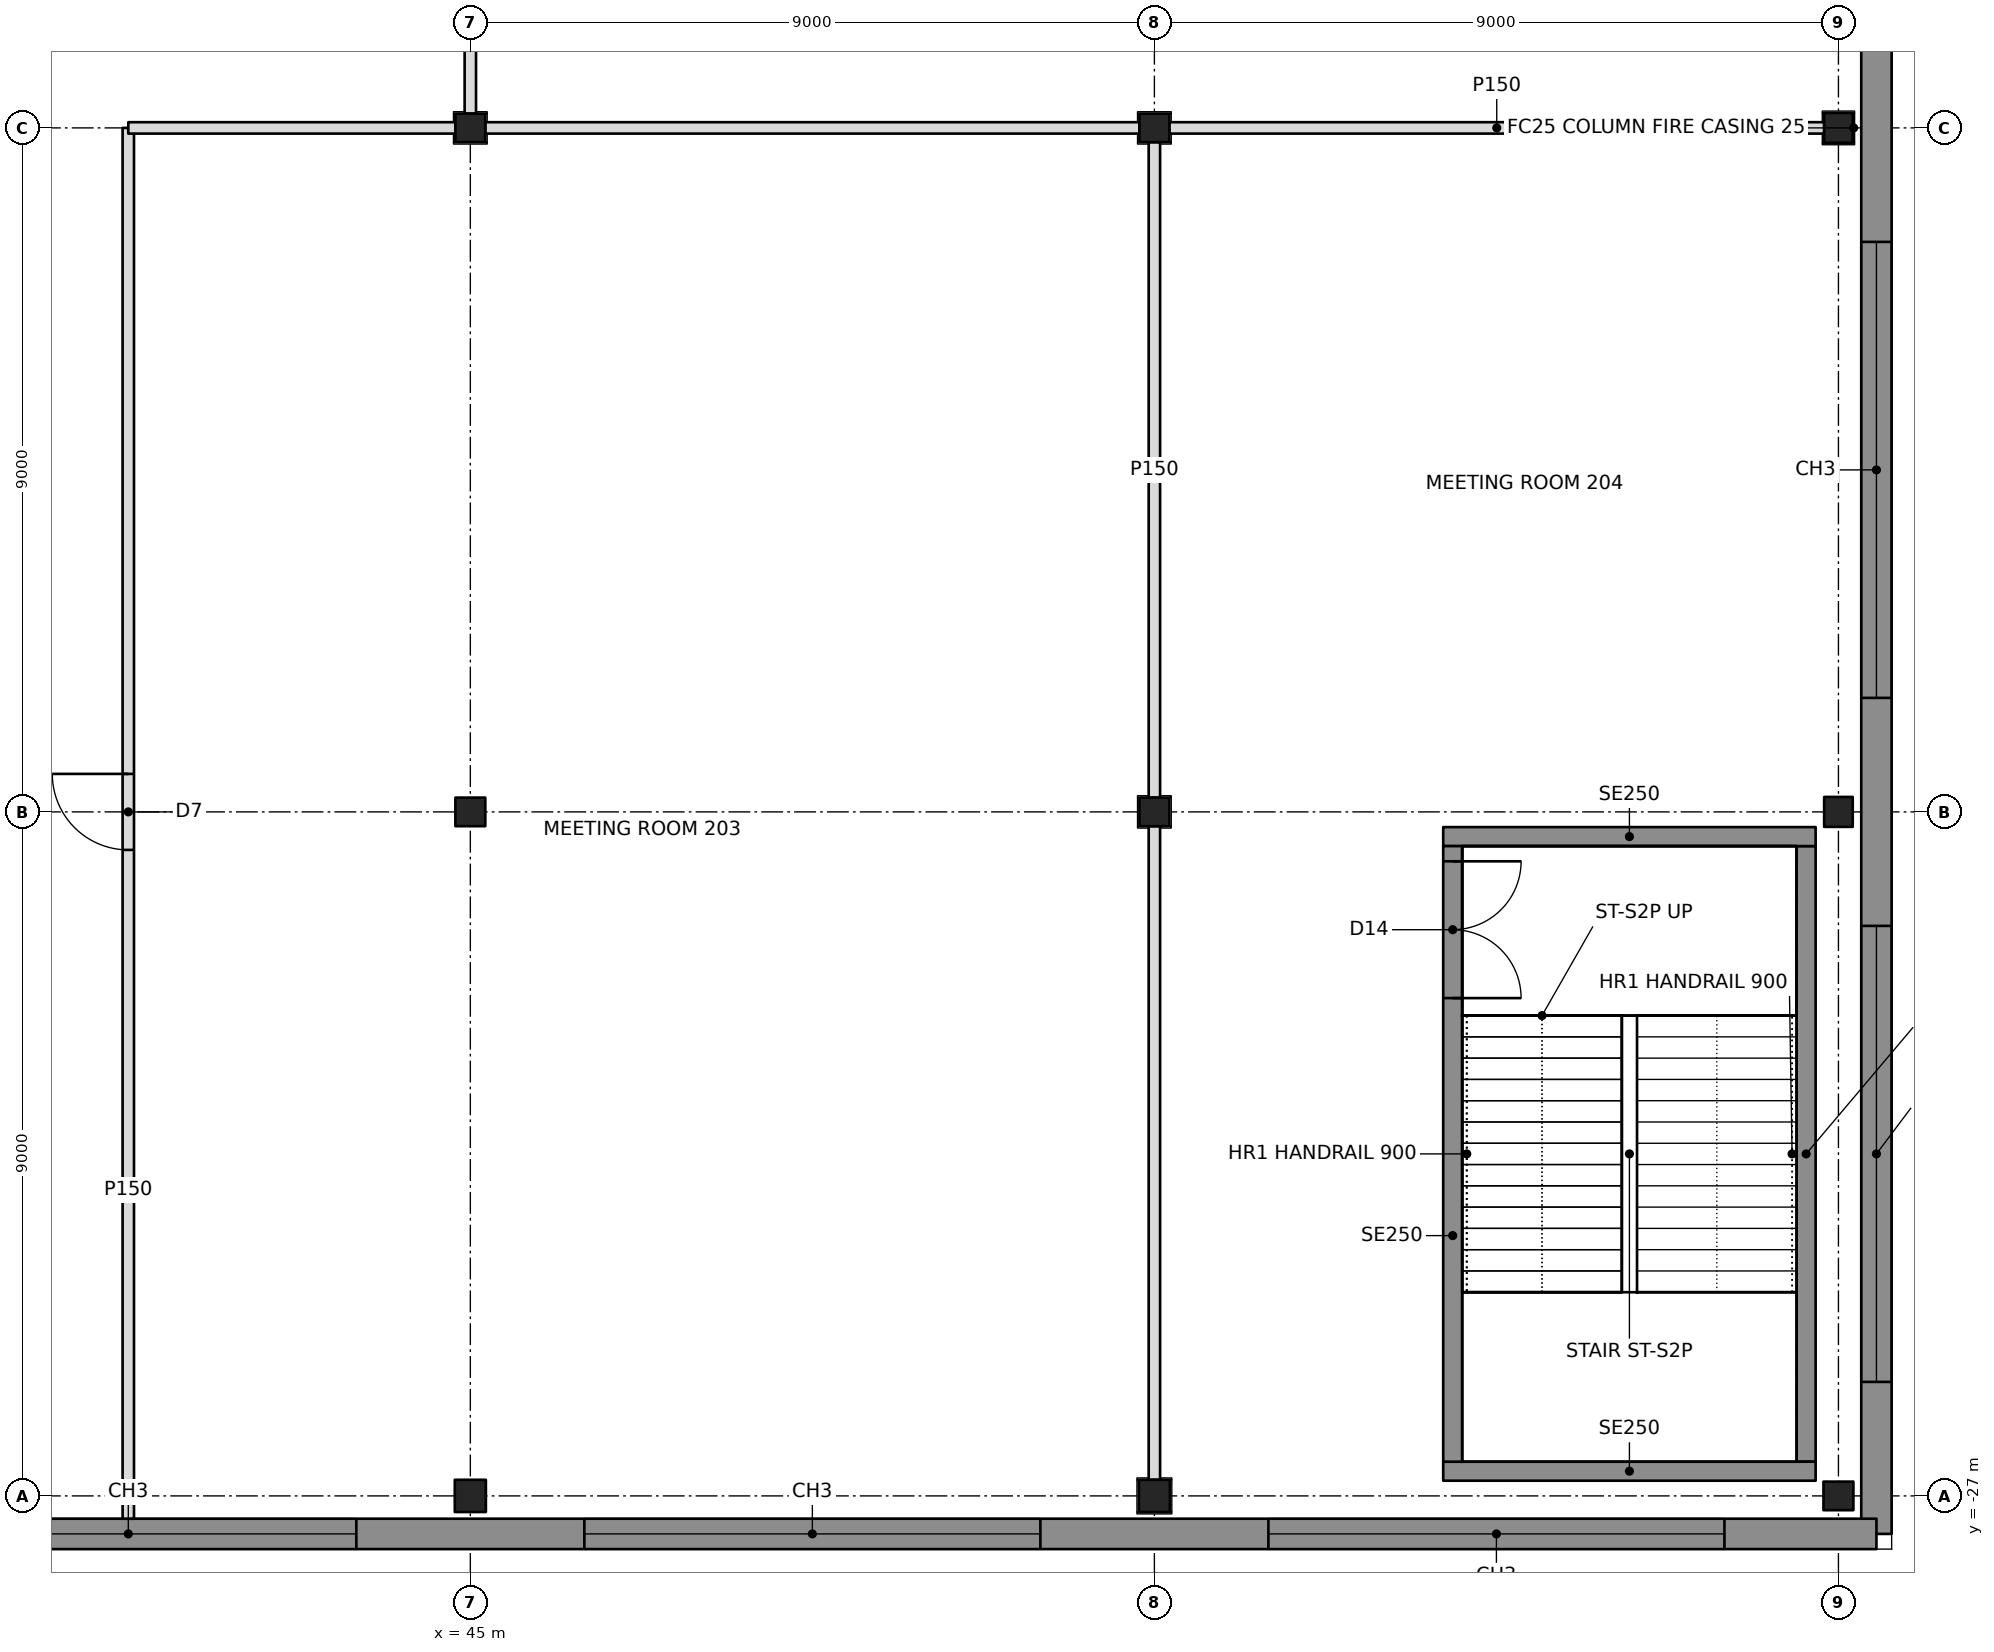
"""IFC4 building model, lengths in metres.
Left out: names, types, materials, properties, quantities, classifications, styles, units other than length and angle.
Written with IfcOpenShell. Run it as: python <this file> out.ifc"""

import sys

from ifc_helpers import new_model, si_unit, direction, frame, frame_2d, origin, origin_2d, place, context, subcontext, project, spatial, rectangle, i_section, extrude, element, fill, save


model = new_model("IFC4")
c1 = context("Model", 3, precision=1e-05, world=origin(), true_north=direction((0.0, 1.0)))
c2 = subcontext(c1, "Body", "Model", "MODEL_VIEW")
j1 = project(units=[si_unit("LENGTHUNIT", "METRE"), si_unit("PLANEANGLEUNIT", "RADIAN")], contexts=[c1])
p1 = place(None, origin())
s1 = spatial("IfcSite", under=j1, at=p1, CompositionType="ELEMENT")
p2 = place(p1, origin())
s2 = spatial("IfcBuilding", under=s1, at=p2, CompositionType="ELEMENT")
p3 = place(p2, frame((0.0, 0.0, 11.0)))
s3 = spatial("IfcBuildingStorey", under=s2, at=p3, CompositionType="ELEMENT", Elevation=11.0)
p4 = place(p3, frame((45.0, -27.0, 0.0), z_axis=(0.0, 0.0, 1.0), x_axis=(1.0, 0.0, 0.0)))
e1 = element("IfcColumn", 1, at=p4, inside=s3, PredefinedType="COLUMN", context=c2, shape_type="SweptSolid", body=[
    extrude(i_section(OverallWidth=0.409, OverallDepth=0.424, WebThickness=0.033, FlangeThickness=0.052, at=origin_2d()), origin(), (0.0, 0.0, 1.0), 5.0),
])
for number, where, z_axis, x_axis in (
    (2, (45.0, -18.0, 0.0), (0.0, 0.0, 1.0), (1.0, 0.0, 0.0)),
    (3, (45.0, -9.0, 0.0), (0.0, 0.0, 1.0), (1.0, 0.0, 0.0)),
):
    element("IfcColumn", number, at=place(p3, frame(where, z_axis=z_axis, x_axis=x_axis)), inside=s3, PredefinedType="COLUMN", context=c2, shape_type="SweptSolid", body=[
        extrude(i_section(OverallWidth=0.394, OverallDepth=0.376, WebThickness=0.017, FlangeThickness=0.028, at=origin_2d()), origin(), (0.0, 0.0, 1.0), 5.0),
    ])
p5 = place(p3, frame((54.0, -27.0, 0.0), z_axis=(0.0, 0.0, 1.0), x_axis=(1.0, 0.0, 0.0)))
e4 = element("IfcColumn", 4, at=p5, inside=s3, PredefinedType="COLUMN", context=c2, shape_type="SweptSolid", body=[
    extrude(i_section(OverallWidth=0.409, OverallDepth=0.424, WebThickness=0.033, FlangeThickness=0.052, at=origin_2d()), origin(), (0.0, 0.0, 1.0), 5.0),
])
for number, where, z_axis, x_axis in (
    (5, (54.0, -18.0, 0.0), (0.0, 0.0, 1.0), (1.0, 0.0, 0.0)),
    (6, (54.0, -9.0, 0.0), (0.0, 0.0, 1.0), (1.0, 0.0, 0.0)),
    (7, (63.0, -27.0, 0.0), (0.0, 0.0, 1.0), (1.0, 0.0, 0.0)),
    (8, (63.0, -18.0, 0.0), (0.0, 0.0, 1.0), (0.0, 1.0, 0.0)),
    (9, (63.0, -9.0, 0.0), (0.0, 0.0, 1.0), (0.0, 1.0, 0.0)),
):
    element("IfcColumn", number, at=place(p3, frame(where, z_axis=z_axis, x_axis=x_axis)), inside=s3, PredefinedType="COLUMN", context=c2, shape_type="SweptSolid", body=[
        extrude(i_section(OverallWidth=0.394, OverallDepth=0.376, WebThickness=0.017, FlangeThickness=0.028, at=origin_2d()), origin(), (0.0, 0.0, 1.0), 5.0),
    ])
p6 = place(p3, frame((-9.5, -27.5, 0.0), z_axis=(0.0, 0.0, 1.0), x_axis=(1.0, 0.0, 0.0)))
e10 = element("IfcWall", 10, at=p6, inside=s3, PredefinedType="SOLIDWALL", context=c2, shape_type="SweptSolid", body=[
    extrude(rectangle(XDim=73.0, YDim=0.4, at=frame_2d((36.5, 0.0))), origin(), (0.0, 0.0, 1.0), 4.75),
])
p7 = place(p6, frame((2.0, 0.0, 0.9)))
e11 = element("IfcOpeningElement", 11, at=p7, cuts=e10, PredefinedType="OPENING", context=c2, shape_type="SweptSolid", body=[
    extrude(rectangle(XDim=6.0, YDim=2.6, at=frame_2d((3.0, 1.3))), frame((0.0, 0.21, 0.0), z_axis=(0.0, -1.0, 0.0), x_axis=(1.0, 0.0, 0.0)), (0.0, 0.0, 1.0), 0.42),
])
p8 = place(p6, frame((11.0, 0.0, 0.9)))
e12 = element("IfcOpeningElement", 12, at=p8, cuts=e10, PredefinedType="OPENING", context=c2, shape_type="SweptSolid", body=[
    extrude(rectangle(XDim=6.0, YDim=2.6, at=frame_2d((3.0, 1.3))), frame((0.0, 0.21, 0.0), z_axis=(0.0, -1.0, 0.0), x_axis=(1.0, 0.0, 0.0)), (0.0, 0.0, 1.0), 0.42),
])
p9 = place(p6, frame((20.0, 0.0, 0.9)))
e13 = element("IfcOpeningElement", 13, at=p9, cuts=e10, PredefinedType="OPENING", context=c2, shape_type="SweptSolid", body=[
    extrude(rectangle(XDim=6.0, YDim=2.6, at=frame_2d((3.0, 1.3))), frame((0.0, 0.21, 0.0), z_axis=(0.0, -1.0, 0.0), x_axis=(1.0, 0.0, 0.0)), (0.0, 0.0, 1.0), 0.42),
])
p10 = place(p6, frame((29.0, 0.0, 0.9)))
e14 = element("IfcOpeningElement", 14, at=p10, cuts=e10, PredefinedType="OPENING", context=c2, shape_type="SweptSolid", body=[
    extrude(rectangle(XDim=6.0, YDim=2.6, at=frame_2d((3.0, 1.3))), frame((0.0, 0.21, 0.0), z_axis=(0.0, -1.0, 0.0), x_axis=(1.0, 0.0, 0.0)), (0.0, 0.0, 1.0), 0.42),
])
p11 = place(p6, frame((38.0, 0.0, 0.9)))
e15 = element("IfcOpeningElement", 15, at=p11, cuts=e10, PredefinedType="OPENING", context=c2, shape_type="SweptSolid", body=[
    extrude(rectangle(XDim=6.0, YDim=2.6, at=frame_2d((3.0, 1.3))), frame((0.0, 0.21, 0.0), z_axis=(0.0, -1.0, 0.0), x_axis=(1.0, 0.0, 0.0)), (0.0, 0.0, 1.0), 0.42),
])
p12 = place(p6, frame((47.0, 0.0, 0.9)))
e16 = element("IfcOpeningElement", 16, at=p12, cuts=e10, PredefinedType="OPENING", context=c2, shape_type="SweptSolid", body=[
    extrude(rectangle(XDim=6.0, YDim=2.6, at=frame_2d((3.0, 1.3))), frame((0.0, 0.21, 0.0), z_axis=(0.0, -1.0, 0.0), x_axis=(1.0, 0.0, 0.0)), (0.0, 0.0, 1.0), 0.42),
])
p13 = place(p6, frame((56.0, 0.0, 0.9)))
e17 = element("IfcOpeningElement", 17, at=p13, cuts=e10, PredefinedType="OPENING", context=c2, shape_type="SweptSolid", body=[
    extrude(rectangle(XDim=6.0, YDim=2.6, at=frame_2d((3.0, 1.3))), frame((0.0, 0.21, 0.0), z_axis=(0.0, -1.0, 0.0), x_axis=(1.0, 0.0, 0.0)), (0.0, 0.0, 1.0), 0.42),
])
p14 = place(p6, frame((65.0, 0.0, 0.9)))
e18 = element("IfcOpeningElement", 18, at=p14, cuts=e10, PredefinedType="OPENING", context=c2, shape_type="SweptSolid", body=[
    extrude(rectangle(XDim=6.0, YDim=2.6, at=frame_2d((3.0, 1.3))), frame((0.0, 0.21, 0.0), z_axis=(0.0, -1.0, 0.0), x_axis=(1.0, 0.0, 0.0)), (0.0, 0.0, 1.0), 0.42),
])
p15 = place(p3, frame((63.5, -27.5, 0.0), z_axis=(0.0, 0.0, 1.0), x_axis=(0.0, 1.0, 0.0)))
e19 = element("IfcWall", 19, at=p15, inside=s3, PredefinedType="SOLIDWALL", context=c2, shape_type="SweptSolid", body=[
    extrude(rectangle(XDim=73.0, YDim=0.4, at=frame_2d((36.5, 0.0))), origin(), (0.0, 0.0, 1.0), 4.75),
])
p16 = place(p15, frame((2.0, 0.0, 0.9)))
e20 = element("IfcOpeningElement", 20, at=p16, cuts=e19, PredefinedType="OPENING", context=c2, shape_type="SweptSolid", body=[
    extrude(rectangle(XDim=6.0, YDim=2.6, at=frame_2d((3.0, 1.3))), frame((0.0, 0.21, 0.0), z_axis=(0.0, -1.0, 0.0), x_axis=(1.0, 0.0, 0.0)), (0.0, 0.0, 1.0), 0.42),
])
p17 = place(p15, frame((11.0, 0.0, 0.9)))
e21 = element("IfcOpeningElement", 21, at=p17, cuts=e19, PredefinedType="OPENING", context=c2, shape_type="SweptSolid", body=[
    extrude(rectangle(XDim=6.0, YDim=2.6, at=frame_2d((3.0, 1.3))), frame((0.0, 0.21, 0.0), z_axis=(0.0, -1.0, 0.0), x_axis=(1.0, 0.0, 0.0)), (0.0, 0.0, 1.0), 0.42),
])
p18 = place(p15, frame((20.0, 0.0, 0.9)))
e22 = element("IfcOpeningElement", 22, at=p18, cuts=e19, PredefinedType="OPENING", context=c2, shape_type="SweptSolid", body=[
    extrude(rectangle(XDim=6.0, YDim=2.6, at=frame_2d((3.0, 1.3))), frame((0.0, 0.21, 0.0), z_axis=(0.0, -1.0, 0.0), x_axis=(1.0, 0.0, 0.0)), (0.0, 0.0, 1.0), 0.42),
])
p19 = place(p15, frame((29.0, 0.0, 0.9)))
e23 = element("IfcOpeningElement", 23, at=p19, cuts=e19, PredefinedType="OPENING", context=c2, shape_type="SweptSolid", body=[
    extrude(rectangle(XDim=6.0, YDim=2.6, at=frame_2d((3.0, 1.3))), frame((0.0, 0.21, 0.0), z_axis=(0.0, -1.0, 0.0), x_axis=(1.0, 0.0, 0.0)), (0.0, 0.0, 1.0), 0.42),
])
p20 = place(p15, frame((38.0, 0.0, 0.9)))
e24 = element("IfcOpeningElement", 24, at=p20, cuts=e19, PredefinedType="OPENING", context=c2, shape_type="SweptSolid", body=[
    extrude(rectangle(XDim=6.0, YDim=2.6, at=frame_2d((3.0, 1.3))), frame((0.0, 0.21, 0.0), z_axis=(0.0, -1.0, 0.0), x_axis=(1.0, 0.0, 0.0)), (0.0, 0.0, 1.0), 0.42),
])
p21 = place(p15, frame((47.0, 0.0, 0.9)))
e25 = element("IfcOpeningElement", 25, at=p21, cuts=e19, PredefinedType="OPENING", context=c2, shape_type="SweptSolid", body=[
    extrude(rectangle(XDim=6.0, YDim=2.6, at=frame_2d((3.0, 1.3))), frame((0.0, 0.21, 0.0), z_axis=(0.0, -1.0, 0.0), x_axis=(1.0, 0.0, 0.0)), (0.0, 0.0, 1.0), 0.42),
])
p22 = place(p15, frame((56.0, 0.0, 0.9)))
e26 = element("IfcOpeningElement", 26, at=p22, cuts=e19, PredefinedType="OPENING", context=c2, shape_type="SweptSolid", body=[
    extrude(rectangle(XDim=6.0, YDim=2.6, at=frame_2d((3.0, 1.3))), frame((0.0, 0.21, 0.0), z_axis=(0.0, -1.0, 0.0), x_axis=(1.0, 0.0, 0.0)), (0.0, 0.0, 1.0), 0.42),
])
p23 = place(p15, frame((65.0, 0.0, 0.9)))
e27 = element("IfcOpeningElement", 27, at=p23, cuts=e19, PredefinedType="OPENING", context=c2, shape_type="SweptSolid", body=[
    extrude(rectangle(XDim=6.0, YDim=2.6, at=frame_2d((3.0, 1.3))), frame((0.0, 0.21, 0.0), z_axis=(0.0, -1.0, 0.0), x_axis=(1.0, 0.0, 0.0)), (0.0, 0.0, 1.0), 0.42),
])
p24 = place(p3, frame((40.5, -27.3, 0.0), z_axis=(0.0, 0.0, 1.0), x_axis=(0.0, 1.0, 0.0)))
e28 = element("IfcWall", 28, at=p24, inside=s3, PredefinedType="PARTITIONING", context=c2, shape_type="SweptSolid", body=[
    extrude(rectangle(XDim=18.3, YDim=0.15, at=frame_2d((9.15, 0.0))), origin(), (0.0, 0.0, 1.0), 3.891),
])
p25 = place(p24, frame((8.8, 0.0, 0.0)))
e29 = element("IfcOpeningElement", 29, at=p25, cuts=e28, PredefinedType="OPENING", context=c2, shape_type="SweptSolid", body=[
    extrude(rectangle(XDim=1.0, YDim=2.1, at=frame_2d((0.5, 1.05))), frame((0.0, 0.085, 0.0), z_axis=(0.0, -1.0, 0.0), x_axis=(1.0, 0.0, 0.0)), (0.0, 0.0, 1.0), 0.17),
])
p26 = place(p3, frame((40.5, -9.0, 0.0), z_axis=(0.0, 0.0, 1.0), x_axis=(1.0, 0.0, 0.0)))
e30 = element("IfcWall", 30, at=p26, inside=s3, PredefinedType="PARTITIONING", context=c2, shape_type="SweptSolid", body=[
    extrude(rectangle(XDim=4.303, YDim=0.15, at=frame_2d((2.152, 0.0))), origin(), (0.0, 0.0, 1.0), 3.892),
])
p27 = place(p3, frame((45.197, -9.0, 0.0), z_axis=(0.0, 0.0, 1.0), x_axis=(1.0, 0.0, 0.0)))
e31 = element("IfcWall", 31, at=p27, inside=s3, PredefinedType="PARTITIONING", context=c2, shape_type="SweptSolid", body=[
    extrude(rectangle(XDim=8.606, YDim=0.15, at=frame_2d((4.303, 0.0))), origin(), (0.0, 0.0, 1.0), 3.892),
])
p28 = place(p3, frame((45.0, -8.812, 0.0), z_axis=(0.0, 0.0, 1.0), x_axis=(0.0, 1.0, 0.0)))
e32 = element("IfcWall", 32, at=p28, inside=s3, PredefinedType="PARTITIONING", context=c2, shape_type="SweptSolid", body=[
    extrude(rectangle(XDim=8.412, YDim=0.15, at=frame_2d((4.206, 0.0))), origin(), (0.0, 0.0, 1.0), 3.892),
])
p29 = place(p3, frame((54.0, -9.188, 0.0), z_axis=(0.0, 0.0, 1.0), x_axis=(0.0, -1.0, 0.0)))
e33 = element("IfcWall", 33, at=p29, inside=s3, PredefinedType="PARTITIONING", context=c2, shape_type="SweptSolid", body=[
    extrude(rectangle(XDim=8.624, YDim=0.15, at=frame_2d((4.312, 0.0))), origin(), (0.0, 0.0, 1.0), 3.892),
])
p30 = place(p3, frame((54.0, -18.188, 0.0), z_axis=(0.0, 0.0, 1.0), x_axis=(0.0, -1.0, 0.0)))
e34 = element("IfcWall", 34, at=p30, inside=s3, PredefinedType="PARTITIONING", context=c2, shape_type="SweptSolid", body=[
    extrude(rectangle(XDim=8.6, YDim=0.15, at=frame_2d((4.3, 0.0))), origin(), (0.0, 0.0, 1.0), 3.892),
])
p31 = place(p3, frame((54.197, -9.0, 0.0), z_axis=(0.0, 0.0, 1.0), x_axis=(1.0, 0.0, 0.0)))
e35 = element("IfcWall", 35, at=p31, inside=s3, PredefinedType="PARTITIONING", context=c2, shape_type="SweptSolid", body=[
    extrude(rectangle(XDim=8.615, YDim=0.15, at=frame_2d((4.308, 0.0))), origin(), (0.0, 0.0, 1.0), 3.892),
])
for number, where, z_axis, x_axis in (
    (36, (57.8, -26.675, 0.0), (0.0, 0.0, 1.0), (1.0, 0.0, 0.0)),
    (37, (57.8, -18.325, 0.0), (0.0, 0.0, 1.0), (1.0, 0.0, 0.0)),
):
    element("IfcWall", number, at=place(p3, frame(where, z_axis=z_axis, x_axis=x_axis)), inside=s3, PredefinedType="SOLIDWALL", context=c2, shape_type="SweptSolid", body=[
        extrude(rectangle(XDim=4.9, YDim=0.25, at=frame_2d((2.45, 0.0))), origin(), (0.0, 0.0, 1.0), 4.75),
    ])
p32 = place(p3, frame((57.925, -26.55, 0.0), z_axis=(0.0, 0.0, 1.0), x_axis=(0.0, 1.0, 0.0)))
e38 = element("IfcWall", 38, at=p32, inside=s3, PredefinedType="SOLIDWALL", context=c2, shape_type="SweptSolid", body=[
    extrude(rectangle(XDim=8.1, YDim=0.25, at=frame_2d((4.05, 0.0))), origin(), (0.0, 0.0, 1.0), 4.75),
])
p33 = place(p32, frame((6.1, 0.0, 0.0)))
e39 = element("IfcOpeningElement", 39, at=p33, cuts=e38, PredefinedType="OPENING", context=c2, shape_type="SweptSolid", body=[
    extrude(rectangle(XDim=1.8, YDim=2.1, at=frame_2d((0.9, 1.05))), frame((0.0, 0.135, 0.0), z_axis=(0.0, -1.0, 0.0), x_axis=(1.0, 0.0, 0.0)), (0.0, 0.0, 1.0), 0.27),
])
p34 = place(p3, frame((62.575, -26.55, 0.0), z_axis=(0.0, 0.0, 1.0), x_axis=(0.0, 1.0, 0.0)))
e40 = element("IfcWall", 40, at=p34, inside=s3, PredefinedType="SOLIDWALL", context=c2, shape_type="SweptSolid", body=[
    extrude(rectangle(XDim=8.1, YDim=0.25, at=frame_2d((4.05, 0.0))), origin(), (0.0, 0.0, 1.0), 4.75),
])
p35 = place(p12, origin())
e41 = element("IfcWindow", 41, at=p35, inside=s3, PartitioningType="TRIPLE_PANEL_VERTICAL", PredefinedType="WINDOW", context=c2, shape_type="SweptSolid", body=[
    extrude(rectangle(XDim=6.0, YDim=2.6, at=frame_2d((3.0, 1.3))), frame((0.0, 0.03, 0.0), z_axis=(0.0, -1.0, 0.0), x_axis=(1.0, 0.0, 0.0)), (0.0, 0.0, 1.0), 0.06),
])
fill(e16, e41)
p36 = place(p13, origin())
e42 = element("IfcWindow", 42, at=p36, inside=s3, PartitioningType="TRIPLE_PANEL_VERTICAL", PredefinedType="WINDOW", context=c2, shape_type="SweptSolid", body=[
    extrude(rectangle(XDim=6.0, YDim=2.6, at=frame_2d((3.0, 1.3))), frame((0.0, 0.03, 0.0), z_axis=(0.0, -1.0, 0.0), x_axis=(1.0, 0.0, 0.0)), (0.0, 0.0, 1.0), 0.06),
])
fill(e17, e42)
p37 = place(p14, origin())
e43 = element("IfcWindow", 43, at=p37, inside=s3, PartitioningType="TRIPLE_PANEL_VERTICAL", PredefinedType="WINDOW", context=c2, shape_type="SweptSolid", body=[
    extrude(rectangle(XDim=6.0, YDim=2.6, at=frame_2d((3.0, 1.3))), frame((0.0, 0.03, 0.0), z_axis=(0.0, -1.0, 0.0), x_axis=(1.0, 0.0, 0.0)), (0.0, 0.0, 1.0), 0.06),
])
fill(e18, e43)
p38 = place(p16, origin())
e44 = element("IfcWindow", 44, at=p38, inside=s3, PartitioningType="TRIPLE_PANEL_VERTICAL", PredefinedType="WINDOW", context=c2, shape_type="SweptSolid", body=[
    extrude(rectangle(XDim=6.0, YDim=2.6, at=frame_2d((3.0, 1.3))), frame((0.0, 0.03, 0.0), z_axis=(0.0, -1.0, 0.0), x_axis=(1.0, 0.0, 0.0)), (0.0, 0.0, 1.0), 0.06),
])
fill(e20, e44)
p39 = place(p17, origin())
e45 = element("IfcWindow", 45, at=p39, inside=s3, PartitioningType="TRIPLE_PANEL_VERTICAL", PredefinedType="WINDOW", context=c2, shape_type="SweptSolid", body=[
    extrude(rectangle(XDim=6.0, YDim=2.6, at=frame_2d((3.0, 1.3))), frame((0.0, 0.03, 0.0), z_axis=(0.0, -1.0, 0.0), x_axis=(1.0, 0.0, 0.0)), (0.0, 0.0, 1.0), 0.06),
])
fill(e21, e45)
p40 = place(p25, origin())
e46 = element("IfcDoor", 46, at=p40, inside=s3, OperationType="SINGLE_SWING_RIGHT", PredefinedType="DOOR", context=c2, shape_type="SweptSolid", body=[
    extrude(rectangle(XDim=1.0, YDim=2.1, at=frame_2d((0.5, 1.05))), frame((0.0, 0.025, 0.0), z_axis=(0.0, -1.0, 0.0), x_axis=(1.0, 0.0, 0.0)), (0.0, 0.0, 1.0), 0.05),
])
fill(e29, e46)
p41 = place(p33, frame((1.8, 0.0, 0.0), z_axis=(0.0, 0.0, 1.0), x_axis=(-1.0, 0.0, 0.0)))
e47 = element("IfcDoor", 47, at=p41, inside=s3, OperationType="DOUBLE_DOOR_SINGLE_SWING", PredefinedType="DOOR", context=c2, shape_type="SweptSolid", body=[
    extrude(rectangle(XDim=1.8, YDim=2.1, at=frame_2d((0.9, 1.05))), frame((0.0, 0.025, 0.0), z_axis=(0.0, -1.0, 0.0), x_axis=(1.0, 0.0, 0.0)), (0.0, 0.0, 1.0), 0.05),
])
fill(e39, e47)
save(model, sys.argv[1])
